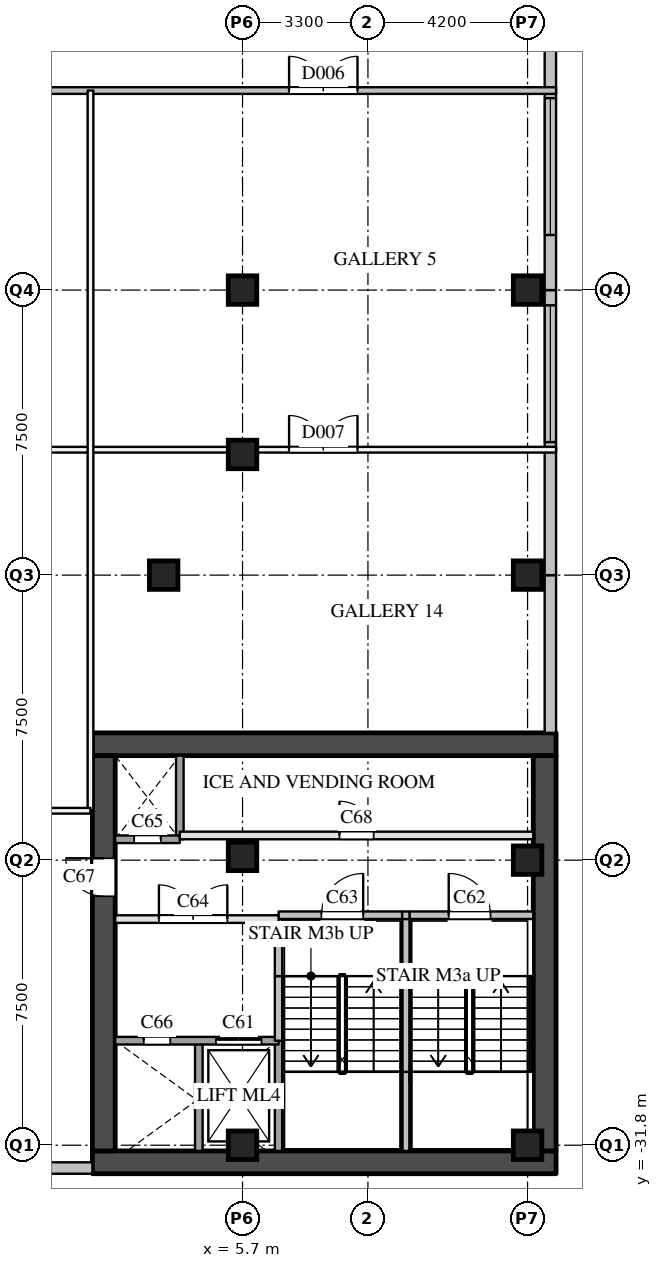
"""IFC4 building model, lengths in metres.
Left out: names, types, materials, properties, quantities, classifications, styles, units other than length and angle.
Written with IfcOpenShell. Run it as: python <this file> out.ifc"""

import sys

from ifc_helpers import new_model, si_unit, direction, frame, frame_2d, origin, origin_2d, place, context, subcontext, project, spatial, rectangle, extrude, element, fill, save


model = new_model("IFC4")
c1 = context("Model", 3, precision=1e-05, world=origin(), true_north=direction((0.0, 1.0)))
c2 = subcontext(c1, "Body", "Model", "MODEL_VIEW")
j1 = project(units=[si_unit("LENGTHUNIT", "METRE"), si_unit("PLANEANGLEUNIT", "RADIAN")], contexts=[c1])
p1 = place(None, origin())
s1 = spatial("IfcSite", under=j1, at=p1, CompositionType="ELEMENT")
p2 = place(p1, origin())
s2 = spatial("IfcBuilding", under=s1, at=p2, CompositionType="ELEMENT")
p3 = place(p2, frame((0.0, 0.0, 14.0)))
s3 = spatial("IfcBuildingStorey", under=s2, at=p3, CompositionType="ELEMENT", Elevation=14.0)
for number, where, z_axis, x_axis in (
    (1, (5.7, -31.8, 0.0), (0.0, 0.0, 1.0), (1.0, 0.0, 0.0)),
    (2, (5.7, -24.2, 0.0), (0.0, 0.0, 1.0), (1.0, 0.0, 0.0)),
    (3, (5.7, -9.3, 0.0), (0.0, 0.0, 1.0), (1.0, 0.0, 0.0)),
    (4, (13.2, -31.8, 0.0), (0.0, 0.0, 1.0), (1.0, 0.0, 0.0)),
    (5, (13.2, -24.3, 0.0), (0.0, 0.0, 1.0), (1.0, 0.0, 0.0)),
    (6, (13.2, -16.8, 0.0), (0.0, 0.0, 1.0), (1.0, 0.0, 0.0)),
    (7, (13.2, -9.3, 0.0), (0.0, 0.0, 1.0), (1.0, 0.0, 0.0)),
    (8, (3.625, -16.8, 0.0), (0.0, 0.0, 1.0), (1.0, 0.0, 0.0)),
    (9, (5.7, -13.625, 0.0), (0.0, 0.0, 1.0), (1.0, 0.0, 0.0)),
):
    element("IfcColumn", number, at=place(p3, frame(where, z_axis=z_axis, x_axis=x_axis)), inside=s3, PredefinedType="COLUMN", context=c2, shape_type="SweptSolid", body=[
        extrude(rectangle(XDim=0.75, YDim=0.75, at=origin_2d()), origin(), (0.0, 0.0, 1.0), 7.0),
    ])
p4 = place(p3, frame((-1.8, -32.4, 0.0), z_axis=(0.0, 0.0, 1.0), x_axis=(1.0, 0.0, 0.0)))
e10 = element("IfcWall", 10, at=p4, inside=s3, PredefinedType="SOLIDWALL", context=c2, shape_type="SweptSolid", body=[
    extrude(rectangle(XDim=3.55, YDim=0.3, at=frame_2d((1.775, 0.0))), origin(), (0.0, 0.0, 1.0), 6.59),
])
p5 = place(p3, frame((13.8, -20.95, 0.0), z_axis=(0.0, 0.0, 1.0), x_axis=(0.0, 1.0, 0.0)))
e11 = element("IfcWall", 11, at=p5, inside=s3, PredefinedType="SOLIDWALL", context=c2, shape_type="SweptSolid", body=[
    extrude(rectangle(XDim=4.15, YDim=0.3, at=frame_2d((2.075, 0.0))), origin(), (0.0, 0.0, 1.0), 6.59),
])
p6 = place(p3, frame((13.8, -16.8, 0.0), z_axis=(0.0, 0.0, 1.0), x_axis=(0.0, 1.0, 0.0)))
e12 = element("IfcWall", 12, at=p6, inside=s3, PredefinedType="SOLIDWALL", context=c2, shape_type="SweptSolid", body=[
    extrude(rectangle(XDim=7.5, YDim=0.3, at=frame_2d((3.75, 0.0))), origin(), (0.0, 0.0, 1.0), 6.59),
])
p7 = place(p6, frame((3.5, 0.0, 0.9)))
e13 = element("IfcOpeningElement", 13, at=p7, cuts=e12, PredefinedType="OPENING", context=c2, shape_type="SweptSolid", body=[
    extrude(rectangle(XDim=3.6, YDim=3.0, at=frame_2d((1.8, 1.5))), frame((0.0, 0.16, 0.0), z_axis=(0.0, -1.0, 0.0), x_axis=(1.0, 0.0, 0.0)), (0.0, 0.0, 1.0), 0.32),
])
p8 = place(p3, frame((13.8, -9.3, 0.0), z_axis=(0.0, 0.0, 1.0), x_axis=(0.0, 1.0, 0.0)))
e14 = element("IfcWall", 14, at=p8, inside=s3, PredefinedType="SOLIDWALL", context=c2, shape_type="SweptSolid", body=[
    extrude(rectangle(XDim=7.5, YDim=0.3, at=frame_2d((3.75, 0.0))), origin(), (0.0, 0.0, 1.0), 6.59),
])
p9 = place(p8, frame((1.45, 0.0, 0.9)))
e15 = element("IfcOpeningElement", 15, at=p9, cuts=e14, PredefinedType="OPENING", context=c2, shape_type="SweptSolid", body=[
    extrude(rectangle(XDim=3.6, YDim=3.0, at=frame_2d((1.8, 1.5))), frame((0.0, 0.16, 0.0), z_axis=(0.0, -1.0, 0.0), x_axis=(1.0, 0.0, 0.0)), (0.0, 0.0, 1.0), 0.32),
])
for number, where, z_axis, x_axis in (
    (16, (1.75, -32.25, 0.0), (0.0, 0.0, 1.0), (1.0, 0.0, 0.0)),
    (17, (1.75, -21.25, 0.0), (0.0, 0.0, 1.0), (1.0, 0.0, 0.0)),
):
    element("IfcWall", number, at=place(p3, frame(where, z_axis=z_axis, x_axis=x_axis)), inside=s3, PredefinedType="SHEAR", context=c2, shape_type="SweptSolid", body=[
        extrude(rectangle(XDim=12.2, YDim=0.6, at=frame_2d((6.1, 0.0))), origin(), (0.0, 0.0, 1.0), 6.59),
    ])
p10 = place(p3, frame((2.05, -31.95, 0.0), z_axis=(0.0, 0.0, 1.0), x_axis=(0.0, 1.0, 0.0)))
e18 = element("IfcWall", 18, at=p10, inside=s3, PredefinedType="SHEAR", context=c2, shape_type="SweptSolid", body=[
    extrude(rectangle(XDim=10.4, YDim=0.6, at=frame_2d((5.2, 0.0))), origin(), (0.0, 0.0, 1.0), 6.59),
])
p11 = place(p10, frame((6.7, 0.0, 0.0)))
e19 = element("IfcOpeningElement", 19, at=p11, cuts=e18, PredefinedType="OPENING", context=c2, shape_type="SweptSolid", body=[
    extrude(rectangle(XDim=1.0, YDim=2.1, at=frame_2d((0.5, 1.05))), frame((0.0, 0.31, 0.0), z_axis=(0.0, -1.0, 0.0), x_axis=(1.0, 0.0, 0.0)), (0.0, 0.0, 1.0), 0.62),
])
p12 = place(p3, frame((13.65, -31.95, 0.0), z_axis=(0.0, 0.0, 1.0), x_axis=(0.0, 1.0, 0.0)))
e20 = element("IfcWall", 20, at=p12, inside=s3, PredefinedType="SHEAR", context=c2, shape_type="SweptSolid", body=[
    extrude(rectangle(XDim=10.4, YDim=0.6, at=frame_2d((5.2, 0.0))), origin(), (0.0, 0.0, 1.0), 6.59),
])
p13 = place(p3, frame((4.05, -23.75, 0.0), z_axis=(0.0, 0.0, 1.0), x_axis=(0.0, 1.0, 0.0)))
e21 = element("IfcWall", 21, at=p13, inside=s3, PredefinedType="SOLIDWALL", context=c2, shape_type="SweptSolid", body=[
    extrude(rectangle(XDim=2.2, YDim=0.2, at=frame_2d((1.1, 0.0))), origin(), (0.0, 0.0, 1.0), 6.59),
])
for number, where, z_axis, x_axis in (
    (22, (4.55, -31.95, 0.0), (0.0, 0.0, 1.0), (0.0, 1.0, 0.0)),
    (23, (6.65, -31.95, 0.0), (0.0, 0.0, 1.0), (0.0, 1.0, 0.0)),
):
    element("IfcWall", number, at=place(p3, frame(where, z_axis=z_axis, x_axis=x_axis)), inside=s3, PredefinedType="SOLIDWALL", context=c2, shape_type="SweptSolid", body=[
        extrude(rectangle(XDim=2.9, YDim=0.2, at=frame_2d((1.45, 0.0))), origin(), (0.0, 0.0, 1.0), 6.59),
    ])
p14 = place(p3, frame((6.65, -29.05, 0.0), z_axis=(0.0, 0.0, 1.0), x_axis=(0.0, 1.0, 0.0)))
e24 = element("IfcWall", 24, at=p14, inside=s3, PredefinedType="SOLIDWALL", context=c2, shape_type="SweptSolid", body=[
    extrude(rectangle(XDim=1.7, YDim=0.2, at=frame_2d((0.85, 0.0))), origin(), (0.0, 0.0, 1.0), 6.59),
])
p15 = place(p3, frame((6.65, -27.35, 0.0), z_axis=(0.0, 0.0, 1.0), x_axis=(0.0, 1.0, 0.0)))
e25 = element("IfcWall", 25, at=p15, inside=s3, PredefinedType="SOLIDWALL", context=c2, shape_type="SweptSolid", body=[
    extrude(rectangle(XDim=1.6, YDim=0.2, at=frame_2d((0.8, 0.0))), origin(), (0.0, 0.0, 1.0), 6.59),
])
p16 = place(p3, frame((10.0, -31.95, 0.0), z_axis=(0.0, 0.0, 1.0), x_axis=(0.0, 1.0, 0.0)))
e26 = element("IfcWall", 26, at=p16, inside=s3, PredefinedType="SOLIDWALL", context=c2, shape_type="SweptSolid", body=[
    extrude(rectangle(XDim=2.08, YDim=0.2, at=frame_2d((1.04, 0.0))), origin(), (0.0, 0.0, 1.0), 6.59),
])
p17 = place(p3, frame((10.0, -29.87, 0.0), z_axis=(0.0, 0.0, 1.0), x_axis=(0.0, 1.0, 0.0)))
e27 = element("IfcWall", 27, at=p17, inside=s3, PredefinedType="SOLIDWALL", context=c2, shape_type="SweptSolid", body=[
    extrude(rectangle(XDim=2.52, YDim=0.2, at=frame_2d((1.26, 0.0))), origin(), (0.0, 0.0, 1.0), 6.59),
])
p18 = place(p3, frame((10.0, -27.35, 0.0), z_axis=(0.0, 0.0, 1.0), x_axis=(0.0, 1.0, 0.0)))
e28 = element("IfcWall", 28, at=p18, inside=s3, PredefinedType="SOLIDWALL", context=c2, shape_type="SweptSolid", body=[
    extrude(rectangle(XDim=1.6, YDim=0.2, at=frame_2d((0.8, 0.0))), origin(), (0.0, 0.0, 1.0), 6.59),
])
p19 = place(p3, frame((2.35, -29.05, 0.0), z_axis=(0.0, 0.0, 1.0), x_axis=(1.0, 0.0, 0.0)))
e29 = element("IfcWall", 29, at=p19, inside=s3, PredefinedType="SOLIDWALL", context=c2, shape_type="SweptSolid", body=[
    extrude(rectangle(XDim=4.3, YDim=0.2, at=frame_2d((2.15, 0.0))), origin(), (0.0, 0.0, 1.0), 6.59),
])
p20 = place(p19, frame((2.65, 0.0, 0.0)))
e30 = element("IfcOpeningElement", 30, at=p20, cuts=e29, PredefinedType="OPENING", context=c2, shape_type="SweptSolid", body=[
    extrude(rectangle(XDim=1.2, YDim=2.1, at=frame_2d((0.6, 1.05))), frame((0.0, 0.11, 0.0), z_axis=(0.0, -1.0, 0.0), x_axis=(1.0, 0.0, 0.0)), (0.0, 0.0, 1.0), 0.22),
])
p21 = place(p19, frame((0.75, 0.0, 0.0)))
e31 = element("IfcOpeningElement", 31, at=p21, cuts=e29, PredefinedType="OPENING", context=c2, shape_type="SweptSolid", body=[
    extrude(rectangle(XDim=0.7, YDim=2.1, at=frame_2d((0.35, 1.05))), frame((0.0, 0.11, 0.0), z_axis=(0.0, -1.0, 0.0), x_axis=(1.0, 0.0, 0.0)), (0.0, 0.0, 1.0), 0.22),
])
p22 = place(p3, frame((2.35, -25.85, 0.0), z_axis=(0.0, 0.0, 1.0), x_axis=(1.0, 0.0, 0.0)))
e32 = element("IfcWall", 32, at=p22, inside=s3, PredefinedType="PARTITIONING", context=c2, shape_type="SweptSolid", body=[
    extrude(rectangle(XDim=4.3, YDim=0.2, at=frame_2d((2.15, 0.0))), origin(), (0.0, 0.0, 1.0), 6.59),
])
p23 = place(p22, frame((1.15, 0.0, 0.0)))
e33 = element("IfcOpeningElement", 33, at=p23, cuts=e32, PredefinedType="OPENING", context=c2, shape_type="SweptSolid", body=[
    extrude(rectangle(XDim=1.8, YDim=2.1, at=frame_2d((0.9, 1.05))), frame((0.0, 0.11, 0.0), z_axis=(0.0, -1.0, 0.0), x_axis=(1.0, 0.0, 0.0)), (0.0, 0.0, 1.0), 0.22),
])
p24 = place(p3, frame((6.65, -25.75, 0.0), z_axis=(0.0, 0.0, 1.0), x_axis=(1.0, 0.0, 0.0)))
e34 = element("IfcWall", 34, at=p24, inside=s3, PredefinedType="SOLIDWALL", context=c2, shape_type="SweptSolid", body=[
    extrude(rectangle(XDim=3.25, YDim=0.2, at=frame_2d((1.625, 0.0))), origin(), (0.0, 0.0, 1.0), 6.59),
])
p25 = place(p24, frame((1.125, 0.0, 0.0)))
e35 = element("IfcOpeningElement", 35, at=p25, cuts=e34, PredefinedType="OPENING", context=c2, shape_type="SweptSolid", body=[
    extrude(rectangle(XDim=1.1, YDim=2.1, at=frame_2d((0.55, 1.05))), frame((0.0, 0.11, 0.0), z_axis=(0.0, -1.0, 0.0), x_axis=(1.0, 0.0, 0.0)), (0.0, 0.0, 1.0), 0.22),
])
p26 = place(p3, frame((9.9, -25.75, 0.0), z_axis=(0.0, 0.0, 1.0), x_axis=(1.0, 0.0, 0.0)))
e36 = element("IfcWall", 36, at=p26, inside=s3, PredefinedType="SOLIDWALL", context=c2, shape_type="SweptSolid", body=[
    extrude(rectangle(XDim=0.2, YDim=0.2, at=frame_2d((0.1, 0.0))), origin(), (0.0, 0.0, 1.0), 6.59),
])
p27 = place(p3, frame((10.1, -25.75, 0.0), z_axis=(0.0, 0.0, 1.0), x_axis=(1.0, 0.0, 0.0)))
e37 = element("IfcWall", 37, at=p27, inside=s3, PredefinedType="SOLIDWALL", context=c2, shape_type="SweptSolid", body=[
    extrude(rectangle(XDim=3.25, YDim=0.2, at=frame_2d((1.625, 0.0))), origin(), (0.0, 0.0, 1.0), 6.59),
])
p28 = place(p27, frame((1.025, 0.0, 0.0)))
e38 = element("IfcOpeningElement", 38, at=p28, cuts=e37, PredefinedType="OPENING", context=c2, shape_type="SweptSolid", body=[
    extrude(rectangle(XDim=1.1, YDim=2.1, at=frame_2d((0.55, 1.05))), frame((0.0, 0.11, 0.0), z_axis=(0.0, -1.0, 0.0), x_axis=(1.0, 0.0, 0.0)), (0.0, 0.0, 1.0), 0.22),
])
p29 = place(p3, frame((4.05, -23.65, 0.0), z_axis=(0.0, 0.0, 1.0), x_axis=(1.0, 0.0, 0.0)))
e39 = element("IfcWall", 39, at=p29, inside=s3, PredefinedType="PARTITIONING", context=c2, shape_type="SweptSolid", body=[
    extrude(rectangle(XDim=9.3, YDim=0.2, at=frame_2d((4.65, 0.0))), origin(), (0.0, 0.0, 1.0), 6.59),
])
p30 = place(p29, frame((4.2, 0.0, 0.0)))
e40 = element("IfcOpeningElement", 40, at=p30, cuts=e39, PredefinedType="OPENING", context=c2, shape_type="SweptSolid", body=[
    extrude(rectangle(XDim=0.9, YDim=2.1, at=frame_2d((0.45, 1.05))), frame((0.0, 0.11, 0.0), z_axis=(0.0, -1.0, 0.0), x_axis=(1.0, 0.0, 0.0)), (0.0, 0.0, 1.0), 0.22),
])
p31 = place(p3, frame((2.35, -23.75, 0.0), z_axis=(0.0, 0.0, 1.0), x_axis=(1.0, 0.0, 0.0)))
e41 = element("IfcWall", 41, at=p31, inside=s3, PredefinedType="SOLIDWALL", context=c2, shape_type="SweptSolid", body=[
    extrude(rectangle(XDim=1.7, YDim=0.2, at=frame_2d((0.85, 0.0))), origin(), (0.0, 0.0, 1.0), 6.59),
])
p32 = place(p31, frame((0.5, 0.0, 0.0)))
e42 = element("IfcOpeningElement", 42, at=p32, cuts=e41, PredefinedType="OPENING", context=c2, shape_type="SweptSolid", body=[
    extrude(rectangle(XDim=0.7, YDim=2.1, at=frame_2d((0.35, 1.05))), frame((0.0, 0.11, 0.0), z_axis=(0.0, -1.0, 0.0), x_axis=(1.0, 0.0, 0.0)), (0.0, 0.0, 1.0), 0.22),
])
p33 = place(p3, frame((-9.3, -4.05, 0.0), z_axis=(0.0, 0.0, 1.0), x_axis=(1.0, 0.0, 0.0)))
e43 = element("IfcWall", 43, at=p33, inside=s3, PredefinedType="PARTITIONING", context=c2, shape_type="SweptSolid", body=[
    extrude(rectangle(XDim=23.25, YDim=0.175, at=frame_2d((11.625, 0.0))), origin(), (0.0, 0.0, 1.0), 5.79),
])
p34 = place(p33, frame((16.225, 0.0, 0.0)))
e44 = element("IfcOpeningElement", 44, at=p34, cuts=e43, PredefinedType="OPENING", context=c2, shape_type="SweptSolid", body=[
    extrude(rectangle(XDim=1.8, YDim=2.1, at=frame_2d((0.9, 1.05))), frame((0.0, 0.097, 0.0), z_axis=(0.0, -1.0, 0.0), x_axis=(1.0, 0.0, 0.0)), (0.0, 0.0, 1.0), 0.195),
])
p35 = place(p3, frame((1.7, -23.0, 0.0), z_axis=(0.0, 0.0, 1.0), x_axis=(1.0, 0.0, 0.0)))
e45 = element("IfcWall", 45, at=p35, inside=s3, PredefinedType="PARTITIONING", context=c2, shape_type="SweptSolid", body=[
    extrude(rectangle(XDim=0.05, YDim=0.15, at=frame_2d((0.025, 0.0))), origin(), (0.0, 0.0, 1.0), 6.59),
])
p36 = place(p3, frame((-9.3, -13.5, 0.0), z_axis=(0.0, 0.0, 1.0), x_axis=(1.0, 0.0, 0.0)))
e46 = element("IfcWall", 46, at=p36, inside=s3, PredefinedType="PARTITIONING", context=c2, shape_type="SweptSolid", body=[
    extrude(rectangle(XDim=23.25, YDim=0.15, at=frame_2d((11.625, 0.0))), origin(), (0.0, 0.0, 1.0), 5.79),
])
p37 = place(p36, frame((16.225, 0.0, 0.0)))
e47 = element("IfcOpeningElement", 47, at=p37, cuts=e46, PredefinedType="OPENING", context=c2, shape_type="SweptSolid", body=[
    extrude(rectangle(XDim=1.8, YDim=2.1, at=frame_2d((0.9, 1.05))), frame((0.0, 0.085, 0.0), z_axis=(0.0, -1.0, 0.0), x_axis=(1.0, 0.0, 0.0)), (0.0, 0.0, 1.0), 0.17),
])
p38 = place(p36, frame((4.6, 0.0, 0.0)))
e48 = element("IfcOpeningElement", 48, at=p38, cuts=e46, PredefinedType="OPENING", context=c2, shape_type="SweptSolid", body=[
    extrude(rectangle(XDim=1.8, YDim=2.1, at=frame_2d((0.9, 1.05))), frame((0.0, 0.085, 0.0), z_axis=(0.0, -1.0, 0.0), x_axis=(1.0, 0.0, 0.0)), (0.0, 0.0, 1.0), 0.17),
])
p39 = place(p3, frame((1.7, -23.0, 0.0), z_axis=(0.0, 0.0, 1.0), x_axis=(0.0, 1.0, 0.0)))
e49 = element("IfcWall", 49, at=p39, inside=s3, PredefinedType="PARTITIONING", context=c2, shape_type="SweptSolid", body=[
    extrude(rectangle(XDim=18.95, YDim=0.15, at=frame_2d((9.475, 0.0))), origin(), (0.0, 0.0, 1.0), 5.79),
])
p40 = place(p3, frame((-9.3, -23.0, 0.0), z_axis=(0.0, 0.0, 1.0), x_axis=(1.0, 0.0, 0.0)))
e50 = element("IfcWall", 50, at=p40, inside=s3, PredefinedType="PARTITIONING", context=c2, shape_type="SweptSolid", body=[
    extrude(rectangle(XDim=11.0, YDim=0.15, at=frame_2d((5.5, 0.0))), origin(), (0.0, 0.0, 1.0), 5.79),
])
p41 = place(p40, frame((5.0, 0.0, 0.0)))
e51 = element("IfcOpeningElement", 51, at=p41, cuts=e50, PredefinedType="OPENING", context=c2, shape_type="SweptSolid", body=[
    extrude(rectangle(XDim=1.0, YDim=2.1, at=frame_2d((0.5, 1.05))), frame((0.0, 0.085, 0.0), z_axis=(0.0, -1.0, 0.0), x_axis=(1.0, 0.0, 0.0)), (0.0, 0.0, 1.0), 0.17),
])
p42 = place(p7, origin())
e52 = element("IfcWindow", 52, at=p42, inside=s3, PartitioningType="SINGLE_PANEL", PredefinedType="WINDOW", context=c2, shape_type="SweptSolid", body=[
    extrude(rectangle(XDim=3.6, YDim=3.0, at=frame_2d((1.8, 1.5))), frame((0.0, 0.03, 0.0), z_axis=(0.0, -1.0, 0.0), x_axis=(1.0, 0.0, 0.0)), (0.0, 0.0, 1.0), 0.06),
])
fill(e13, e52)
p43 = place(p9, origin())
e53 = element("IfcWindow", 53, at=p43, inside=s3, PartitioningType="SINGLE_PANEL", PredefinedType="WINDOW", context=c2, shape_type="SweptSolid", body=[
    extrude(rectangle(XDim=3.6, YDim=3.0, at=frame_2d((1.8, 1.5))), frame((0.0, 0.03, 0.0), z_axis=(0.0, -1.0, 0.0), x_axis=(1.0, 0.0, 0.0)), (0.0, 0.0, 1.0), 0.06),
])
fill(e15, e53)
p44 = place(p20, origin())
e54 = element("IfcDoor", 54, at=p44, inside=s3, OperationType="SLIDING_TO_LEFT", PredefinedType="DOOR", context=c2, shape_type="SweptSolid", body=[
    extrude(rectangle(XDim=1.2, YDim=2.1, at=frame_2d((0.6, 1.05))), frame((0.0, 0.025, 0.0), z_axis=(0.0, -1.0, 0.0), x_axis=(1.0, 0.0, 0.0)), (0.0, 0.0, 1.0), 0.05),
])
fill(e30, e54)
p45 = place(p28, origin())
e55 = element("IfcDoor", 55, at=p45, inside=s3, OperationType="SINGLE_SWING_LEFT", PredefinedType="DOOR", context=c2, shape_type="SweptSolid", body=[
    extrude(rectangle(XDim=1.1, YDim=2.1, at=frame_2d((0.55, 1.05))), frame((0.0, 0.025, 0.0), z_axis=(0.0, -1.0, 0.0), x_axis=(1.0, 0.0, 0.0)), (0.0, 0.0, 1.0), 0.05),
])
fill(e38, e55)
p46 = place(p25, origin())
e56 = element("IfcDoor", 56, at=p46, inside=s3, OperationType="SINGLE_SWING_RIGHT", PredefinedType="DOOR", context=c2, shape_type="SweptSolid", body=[
    extrude(rectangle(XDim=1.1, YDim=2.1, at=frame_2d((0.55, 1.05))), frame((0.0, 0.025, 0.0), z_axis=(0.0, -1.0, 0.0), x_axis=(1.0, 0.0, 0.0)), (0.0, 0.0, 1.0), 0.05),
])
fill(e35, e56)
p47 = place(p23, origin())
e57 = element("IfcDoor", 57, at=p47, inside=s3, OperationType="DOUBLE_DOOR_SINGLE_SWING", PredefinedType="DOOR", context=c2, shape_type="SweptSolid", body=[
    extrude(rectangle(XDim=1.8, YDim=2.1, at=frame_2d((0.9, 1.05))), frame((0.0, 0.025, 0.0), z_axis=(0.0, -1.0, 0.0), x_axis=(1.0, 0.0, 0.0)), (0.0, 0.0, 1.0), 0.05),
])
fill(e33, e57)
p48 = place(p32, origin())
e58 = element("IfcDoor", 58, at=p48, inside=s3, OperationType="SINGLE_SWING_RIGHT", PredefinedType="DOOR", context=c2, shape_type="SweptSolid", body=[
    extrude(rectangle(XDim=0.7, YDim=2.1, at=frame_2d((0.35, 1.05))), frame((0.0, 0.025, 0.0), z_axis=(0.0, -1.0, 0.0), x_axis=(1.0, 0.0, 0.0)), (0.0, 0.0, 1.0), 0.05),
])
fill(e42, e58)
p49 = place(p21, origin())
e59 = element("IfcDoor", 59, at=p49, inside=s3, OperationType="SINGLE_SWING_LEFT", PredefinedType="DOOR", context=c2, shape_type="SweptSolid", body=[
    extrude(rectangle(XDim=0.7, YDim=2.1, at=frame_2d((0.35, 1.05))), frame((0.0, 0.025, 0.0), z_axis=(0.0, -1.0, 0.0), x_axis=(1.0, 0.0, 0.0)), (0.0, 0.0, 1.0), 0.05),
])
fill(e31, e59)
p50 = place(p11, origin())
e60 = element("IfcDoor", 60, at=p50, inside=s3, OperationType="SINGLE_SWING_RIGHT", PredefinedType="DOOR", context=c2, shape_type="SweptSolid", body=[
    extrude(rectangle(XDim=1.0, YDim=2.1, at=frame_2d((0.5, 1.05))), frame((0.0, 0.025, 0.0), z_axis=(0.0, -1.0, 0.0), x_axis=(1.0, 0.0, 0.0)), (0.0, 0.0, 1.0), 0.05),
])
fill(e19, e60)
p51 = place(p30, origin())
e61 = element("IfcDoor", 61, at=p51, inside=s3, OperationType="SINGLE_SWING_LEFT", PredefinedType="DOOR", context=c2, shape_type="SweptSolid", body=[
    extrude(rectangle(XDim=0.9, YDim=2.1, at=frame_2d((0.45, 1.05))), frame((0.0, 0.025, 0.0), z_axis=(0.0, -1.0, 0.0), x_axis=(1.0, 0.0, 0.0)), (0.0, 0.0, 1.0), 0.05),
])
fill(e40, e61)
p52 = place(p34, origin())
e62 = element("IfcDoor", 62, at=p52, inside=s3, OperationType="DOUBLE_DOOR_SINGLE_SWING", PredefinedType="DOOR", context=c2, shape_type="SweptSolid", body=[
    extrude(rectangle(XDim=1.8, YDim=2.1, at=frame_2d((0.9, 1.05))), frame((0.0, 0.025, 0.0), z_axis=(0.0, -1.0, 0.0), x_axis=(1.0, 0.0, 0.0)), (0.0, 0.0, 1.0), 0.05),
])
fill(e44, e62)
p53 = place(p37, origin())
e63 = element("IfcDoor", 63, at=p53, inside=s3, OperationType="DOUBLE_DOOR_SINGLE_SWING", PredefinedType="DOOR", context=c2, shape_type="SweptSolid", body=[
    extrude(rectangle(XDim=1.8, YDim=2.1, at=frame_2d((0.9, 1.05))), frame((0.0, 0.025, 0.0), z_axis=(0.0, -1.0, 0.0), x_axis=(1.0, 0.0, 0.0)), (0.0, 0.0, 1.0), 0.05),
])
fill(e47, e63)
save(model, sys.argv[1])
